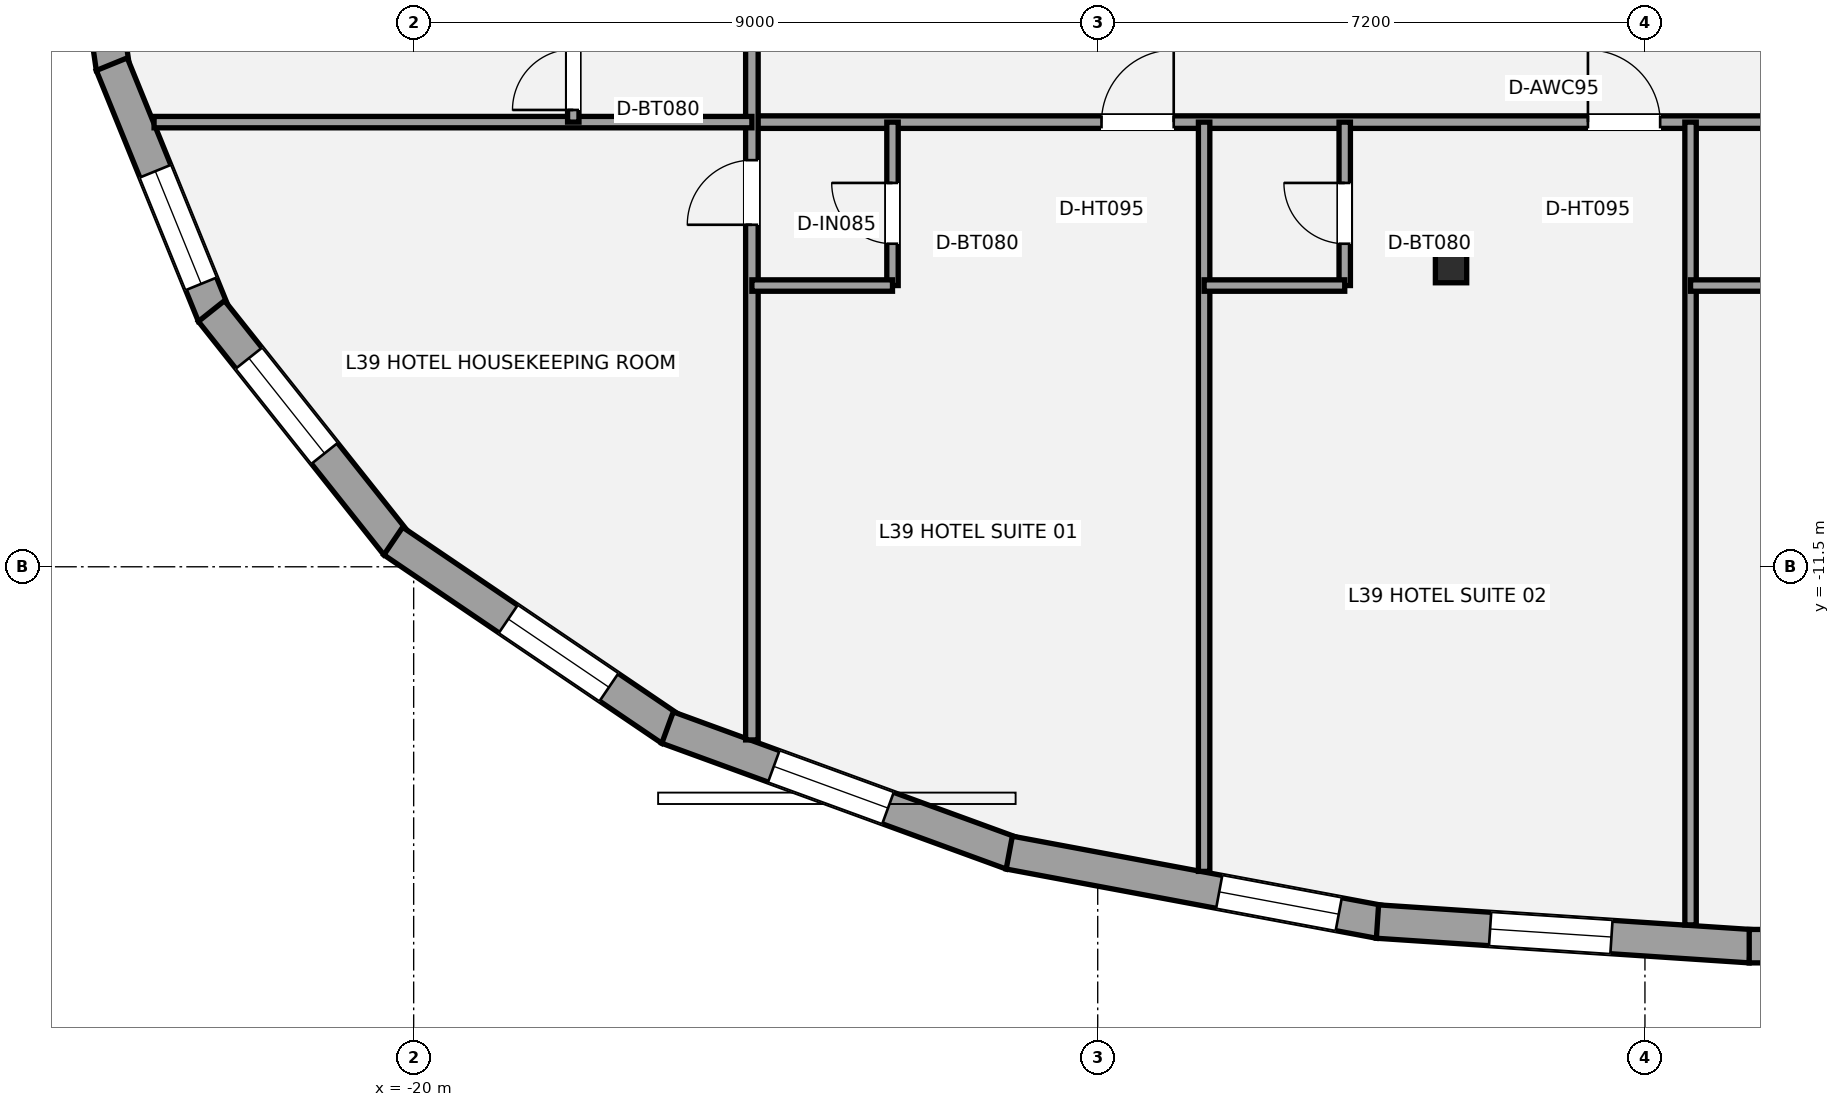
"""IFC4 building model, lengths in metres.
Left out: names, types, materials, properties, quantities, classifications, styles, units other than length and angle.
Written with IfcOpenShell. Run it as: python <this file> out.ifc"""

import sys

from ifc_helpers import new_model, si_unit, direction, frame, frame_2d, origin, origin_2d, place, context, subcontext, project, spatial, rectangle, i_section, extrude, element, fill, save


model = new_model("IFC4")
c1 = context("Model", 3, precision=1e-05, world=origin(), true_north=direction((0.0, 1.0)))
c2 = subcontext(c1, "Body", "Model", "MODEL_VIEW")
j1 = project(units=[si_unit("LENGTHUNIT", "METRE"), si_unit("PLANEANGLEUNIT", "RADIAN")], contexts=[c1])
p1 = place(None, origin())
s1 = spatial("IfcSite", under=j1, at=p1, CompositionType="ELEMENT")
p2 = place(p1, origin())
s2 = spatial("IfcBuilding", under=s1, at=p2, CompositionType="ELEMENT")
p3 = place(p2, frame((0.0, 0.0, 147.0)))
s3 = spatial("IfcBuildingStorey", under=s2, at=p3, CompositionType="ELEMENT", Elevation=147.0)
p4 = place(p3, frame((-6.351, -7.546, 0.0), z_axis=(0.0, 0.0, 1.0), x_axis=(1.0, 0.0, 0.0)))
e1 = element("IfcColumn", 1, at=p4, inside=s3, PredefinedType="COLUMN", context=c2, shape_type="SweptSolid", body=[
    extrude(i_section(OverallWidth=0.412, OverallDepth=0.435, WebThickness=0.036, FlangeThickness=0.057, at=origin_2d()), origin(), (0.0, 0.0, 1.0), 3.2),
])
p5 = place(p3, frame((-23.958, -4.94, 0.0), z_axis=(0.0, 0.0, 1.0), x_axis=(-0.142296299692, 0.989824107149, 0.0)))
e2 = element("IfcWall", 2, at=p5, inside=s3, PredefinedType="STANDARD", context=c2, shape_type="SweptSolid", body=[
    extrude(rectangle(XDim=3.359, YDim=0.44, at=frame_2d((1.68, 0.0))), origin(), (0.0, 0.0, 1.0), 2.315),
])
p6 = place(p5, frame((1.414, 0.0, 0.58)))
e3 = element("IfcOpeningElement", 3, at=p6, cuts=e2, PredefinedType="OPENING", context=c2, shape_type="SweptSolid", body=[
    extrude(rectangle(XDim=1.6, YDim=1.55, at=frame_2d((0.8, 0.775))), frame((0.0, 0.23, 0.0), z_axis=(0.0, -1.0, 0.0), x_axis=(1.0, 0.0, 0.0)), (0.0, 0.0, 1.0), 0.46),
])
p7 = place(p3, frame((-22.629, -8.189, 0.0), z_axis=(0.0, 0.0, 1.0), x_axis=(-0.376863872061, 0.926268655378, 0.0)))
e4 = element("IfcWall", 4, at=p7, inside=s3, PredefinedType="STANDARD", context=c2, shape_type="SweptSolid", body=[
    extrude(rectangle(XDim=3.564, YDim=0.44, at=frame_2d((1.782, 0.0))), origin(), (0.0, 0.0, 1.0), 2.315),
])
p8 = place(p7, frame((0.444, 0.0, 0.58)))
e5 = element("IfcOpeningElement", 5, at=p8, cuts=e4, PredefinedType="OPENING", context=c2, shape_type="SweptSolid", body=[
    extrude(rectangle(XDim=1.6, YDim=1.55, at=frame_2d((0.8, 0.775))), frame((0.0, 0.23, 0.0), z_axis=(0.0, -1.0, 0.0), x_axis=(1.0, 0.0, 0.0)), (0.0, 0.0, 1.0), 0.46),
])
p9 = place(p3, frame((-20.22, -11.207, 0.0), z_axis=(0.0, 0.0, 1.0), x_axis=(-0.622149266174, 0.782898646441, 0.0)))
e6 = element("IfcWall", 6, at=p9, inside=s3, PredefinedType="STANDARD", context=c2, shape_type="SweptSolid", body=[
    extrude(rectangle(XDim=3.923, YDim=0.44, at=frame_2d((1.961, 0.0))), origin(), (0.0, 0.0, 1.0), 2.315),
])
p10 = place(p9, frame((1.531, 0.0, 0.58)))
e7 = element("IfcOpeningElement", 7, at=p10, cuts=e6, PredefinedType="OPENING", context=c2, shape_type="SweptSolid", body=[
    extrude(rectangle(XDim=1.6, YDim=1.55, at=frame_2d((0.8, 0.775))), frame((0.0, 0.23, 0.0), z_axis=(0.0, -1.0, 0.0), x_axis=(1.0, 0.0, 0.0)), (0.0, 0.0, 1.0), 0.46),
])
p11 = place(p3, frame((-16.612, -13.64, 0.0), z_axis=(0.0, 0.0, 1.0), x_axis=(-0.827774624611, 0.561060755044, 0.0)))
e8 = element("IfcWall", 8, at=p11, inside=s3, PredefinedType="STANDARD", context=c2, shape_type="SweptSolid", body=[
    extrude(rectangle(XDim=4.417, YDim=0.44, at=frame_2d((2.209, 0.0))), origin(), (0.0, 0.0, 1.0), 2.315),
])
p12 = place(p11, frame((0.99, 0.0, 0.58)))
e9 = element("IfcOpeningElement", 9, at=p12, cuts=e8, PredefinedType="OPENING", context=c2, shape_type="SweptSolid", body=[
    extrude(rectangle(XDim=1.6, YDim=1.55, at=frame_2d((0.8, 0.775))), frame((0.0, 0.23, 0.0), z_axis=(0.0, -1.0, 0.0), x_axis=(1.0, 0.0, 0.0)), (0.0, 0.0, 1.0), 0.46),
])
p13 = place(p3, frame((-12.129, -15.27, 0.0), z_axis=(0.0, 0.0, 1.0), x_axis=(-0.939349296455, 0.342961950147, 0.0)))
e10 = element("IfcWall", 10, at=p13, inside=s3, PredefinedType="STANDARD", context=c2, shape_type="SweptSolid", body=[
    extrude(rectangle(XDim=4.823, YDim=0.44, at=frame_2d((2.412, 0.0))), origin(), (0.0, 0.0, 1.0), 2.315),
])
p14 = place(p13, frame((1.736, 0.0, 0.58)))
e11 = element("IfcOpeningElement", 11, at=p14, cuts=e10, PredefinedType="OPENING", context=c2, shape_type="SweptSolid", body=[
    extrude(rectangle(XDim=1.6, YDim=1.55, at=frame_2d((0.8, 0.775))), frame((0.0, 0.23, 0.0), z_axis=(0.0, -1.0, 0.0), x_axis=(1.0, 0.0, 0.0)), (0.0, 0.0, 1.0), 0.46),
])
p15 = place(p3, frame((-7.293, -16.171, 0.0), z_axis=(0.0, 0.0, 1.0), x_axis=(-0.98297578121, 0.183735172338, 0.0)))
e12 = element("IfcWall", 12, at=p15, inside=s3, PredefinedType="STANDARD", context=c2, shape_type="SweptSolid", body=[
    extrude(rectangle(XDim=4.955, YDim=0.44, at=frame_2d((2.478, 0.0))), origin(), (0.0, 0.0, 1.0), 2.315),
])
p16 = place(p15, frame((0.545, 0.0, 0.58)))
e13 = element("IfcOpeningElement", 13, at=p16, cuts=e12, PredefinedType="OPENING", context=c2, shape_type="SweptSolid", body=[
    extrude(rectangle(XDim=1.6, YDim=1.55, at=frame_2d((0.8, 0.775))), frame((0.0, 0.23, 0.0), z_axis=(0.0, -1.0, 0.0), x_axis=(1.0, 0.0, 0.0)), (0.0, 0.0, 1.0), 0.46),
])
p17 = place(p3, frame((-2.414, -16.492, 0.0), z_axis=(0.0, 0.0, 1.0), x_axis=(-0.997822793171, 0.065952054018, 0.0)))
e14 = element("IfcWall", 14, at=p17, inside=s3, PredefinedType="STANDARD", context=c2, shape_type="SweptSolid", body=[
    extrude(rectangle(XDim=4.916, YDim=0.44, at=frame_2d((2.458, 0.0))), origin(), (0.0, 0.0, 1.0), 2.315),
])
p18 = place(p17, frame((1.831, 0.0, 0.58)))
e15 = element("IfcOpeningElement", 15, at=p18, cuts=e14, PredefinedType="OPENING", context=c2, shape_type="SweptSolid", body=[
    extrude(rectangle(XDim=1.6, YDim=1.55, at=frame_2d((0.8, 0.775))), frame((0.0, 0.23, 0.0), z_axis=(0.0, -1.0, 0.0), x_axis=(1.0, 0.0, 0.0)), (0.0, 0.0, 1.0), 0.46),
])
p19 = place(p3, frame((2.428, -16.491, 0.0), z_axis=(0.0, 0.0, 1.0), x_axis=(-1.0, 0.0, 0.0)))
e16 = element("IfcWall", 16, at=p19, inside=s3, PredefinedType="STANDARD", context=c2, shape_type="SweptSolid", body=[
    extrude(rectangle(XDim=4.856, YDim=0.44, at=frame_2d((2.428, 0.0))), origin(), (0.0, 0.0, 1.0), 2.315),
])
p20 = place(p19, frame((1.431, 0.0, 0.58)))
e17 = element("IfcOpeningElement", 17, at=p20, cuts=e16, PredefinedType="OPENING", context=c2, shape_type="SweptSolid", body=[
    extrude(rectangle(XDim=1.6, YDim=1.55, at=frame_2d((0.8, 0.775))), frame((0.0, 0.23, 0.0), z_axis=(0.0, -1.0, 0.0), x_axis=(1.0, 0.0, 0.0)), (0.0, 0.0, 1.0), 0.46),
])
p21 = place(p3, frame((-15.55, -5.65, 0.0), z_axis=(0.0, 0.0, 1.0), x_axis=(1.0, 0.0, 0.0)))
e18 = element("IfcWall", 18, at=p21, inside=s3, PredefinedType="PARTITIONING", context=c2, shape_type="SweptSolid", body=[
    extrude(rectangle(XDim=31.1, YDim=0.165, at=frame_2d((15.55, 0.0))), origin(), (0.0, 0.0, 1.0), 2.398),
])
p22 = place(p21, frame((4.6, 0.0, 0.0)))
e19 = element("IfcOpeningElement", 19, at=p22, cuts=e18, PredefinedType="OPENING", context=c2, shape_type="SweptSolid", body=[
    extrude(rectangle(XDim=0.95, YDim=2.15, at=frame_2d((0.475, 1.075))), frame((0.0, 0.093, 0.0), z_axis=(0.0, -1.0, 0.0), x_axis=(1.0, 0.0, 0.0)), (0.0, 0.0, 1.0), 0.185),
])
p23 = place(p21, frame((11.0, 0.0, 0.0)))
e20 = element("IfcOpeningElement", 20, at=p23, cuts=e18, PredefinedType="OPENING", context=c2, shape_type="SweptSolid", body=[
    extrude(rectangle(XDim=0.95, YDim=2.15, at=frame_2d((0.475, 1.075))), frame((0.0, 0.093, 0.0), z_axis=(0.0, -1.0, 0.0), x_axis=(1.0, 0.0, 0.0)), (0.0, 0.0, 1.0), 0.185),
])
p24 = place(p21, frame((17.4, 0.0, 0.0)))
e21 = element("IfcOpeningElement", 21, at=p24, cuts=e18, PredefinedType="OPENING", context=c2, shape_type="SweptSolid", body=[
    extrude(rectangle(XDim=0.95, YDim=2.15, at=frame_2d((0.475, 1.075))), frame((0.0, 0.093, 0.0), z_axis=(0.0, -1.0, 0.0), x_axis=(1.0, 0.0, 0.0)), (0.0, 0.0, 1.0), 0.185),
])
p25 = place(p21, frame((23.8, 0.0, 0.0)))
e22 = element("IfcOpeningElement", 22, at=p25, cuts=e18, PredefinedType="OPENING", context=c2, shape_type="SweptSolid", body=[
    extrude(rectangle(XDim=0.95, YDim=2.15, at=frame_2d((0.475, 1.075))), frame((0.0, 0.093, 0.0), z_axis=(0.0, -1.0, 0.0), x_axis=(1.0, 0.0, 0.0)), (0.0, 0.0, 1.0), 0.185),
])
p26 = place(p21, frame((29.75, 0.0, 0.0)))
e23 = element("IfcOpeningElement", 23, at=p26, cuts=e18, PredefinedType="OPENING", context=c2, shape_type="SweptSolid", body=[
    extrude(rectangle(XDim=0.95, YDim=2.15, at=frame_2d((0.475, 1.075))), frame((0.0, 0.093, 0.0), z_axis=(0.0, -1.0, 0.0), x_axis=(1.0, 0.0, 0.0)), (0.0, 0.0, 1.0), 0.185),
])
p27 = place(p3, frame((-15.55, -13.778, 0.0), z_axis=(0.0, 0.0, 1.0), x_axis=(0.0, 1.0, 0.0)))
e24 = element("IfcWall", 24, at=p27, inside=s3, PredefinedType="PARTITIONING", context=c2, shape_type="SweptSolid", body=[
    extrude(rectangle(XDim=21.328, YDim=0.165, at=frame_2d((10.664, 0.0))), origin(), (0.0, 0.0, 1.0), 2.473),
])
p28 = place(p27, frame((6.777, 0.0, 0.0)))
e25 = element("IfcOpeningElement", 25, at=p28, cuts=e24, PredefinedType="OPENING", context=c2, shape_type="SweptSolid", body=[
    extrude(rectangle(XDim=0.85, YDim=2.1, at=frame_2d((0.425, 1.05))), frame((0.0, 0.093, 0.0), z_axis=(0.0, -1.0, 0.0), x_axis=(1.0, 0.0, 0.0)), (0.0, 0.0, 1.0), 0.185),
])
p29 = place(p27, frame((10.827, 0.0, 0.0)))
e26 = element("IfcOpeningElement", 26, at=p29, cuts=e24, PredefinedType="OPENING", context=c2, shape_type="SweptSolid", body=[
    extrude(rectangle(XDim=0.95, YDim=2.15, at=frame_2d((0.475, 1.075))), frame((0.0, 0.093, 0.0), z_axis=(0.0, -1.0, 0.0), x_axis=(1.0, 0.0, 0.0)), (0.0, 0.0, 1.0), 0.185),
])
p30 = place(p27, frame((15.227, 0.0, 0.0)))
e27 = element("IfcOpeningElement", 27, at=p30, cuts=e24, PredefinedType="OPENING", context=c2, shape_type="SweptSolid", body=[
    extrude(rectangle(XDim=0.95, YDim=2.15, at=frame_2d((0.475, 1.075))), frame((0.0, 0.093, 0.0), z_axis=(0.0, -1.0, 0.0), x_axis=(1.0, 0.0, 0.0)), (0.0, 0.0, 1.0), 0.185),
])
p31 = place(p27, frame((19.977, 0.0, 0.0)))
e28 = element("IfcOpeningElement", 28, at=p31, cuts=e24, PredefinedType="OPENING", context=c2, shape_type="SweptSolid", body=[
    extrude(rectangle(XDim=0.95, YDim=2.15, at=frame_2d((0.475, 1.075))), frame((0.0, 0.093, 0.0), z_axis=(0.0, -1.0, 0.0), x_axis=(1.0, 0.0, 0.0)), (0.0, 0.0, 1.0), 0.185),
])
p32 = place(p3, frame((-23.416, -5.65, 0.0), z_axis=(0.0, 0.0, 1.0), x_axis=(1.0, 0.0, 0.0)))
e29 = element("IfcWall", 29, at=p32, inside=s3, PredefinedType="PLUMBINGWALL", context=c2, shape_type="SweptSolid", body=[
    extrude(rectangle(XDim=7.866, YDim=0.15, at=frame_2d((3.933, 0.0))), origin(), (0.0, 0.0, 1.0), 2.473),
])
p33 = place(p3, frame((-9.6, -15.508, 0.0), z_axis=(0.0, 0.0, 1.0), x_axis=(0.0, 1.0, 0.0)))
e30 = element("IfcWall", 30, at=p33, inside=s3, PredefinedType="PLUMBINGWALL", context=c2, shape_type="SweptSolid", body=[
    extrude(rectangle(XDim=9.858, YDim=0.15, at=frame_2d((4.929, 0.0))), origin(), (0.0, 0.0, 1.0), 3.02),
])
p34 = place(p3, frame((-3.2, -16.211, 0.0), z_axis=(0.0, 0.0, 1.0), x_axis=(0.0, 1.0, 0.0)))
e31 = element("IfcWall", 31, at=p34, inside=s3, PredefinedType="PLUMBINGWALL", context=c2, shape_type="SweptSolid", body=[
    extrude(rectangle(XDim=10.561, YDim=0.15, at=frame_2d((5.281, 0.0))), origin(), (0.0, 0.0, 1.0), 2.473),
])
p35 = place(p3, frame((-13.7, -7.8, 0.0), z_axis=(0.0, 0.0, 1.0), x_axis=(0.0, 1.0, 0.0)))
e32 = element("IfcWall", 32, at=p35, inside=s3, PredefinedType="PLUMBINGWALL", context=c2, shape_type="SweptSolid", body=[
    extrude(rectangle(XDim=2.15, YDim=0.15, at=frame_2d((1.075, 0.0))), origin(), (0.0, 0.0, 1.0), 3.02),
])
p36 = place(p35, frame((0.55, 0.0, 0.0)))
e33 = element("IfcOpeningElement", 33, at=p36, cuts=e32, PredefinedType="OPENING", context=c2, shape_type="SweptSolid", body=[
    extrude(rectangle(XDim=0.8, YDim=2.1, at=frame_2d((0.4, 1.05))), frame((0.0, 0.085, 0.0), z_axis=(0.0, -1.0, 0.0), x_axis=(1.0, 0.0, 0.0)), (0.0, 0.0, 1.0), 0.17),
])
p37 = place(p3, frame((-15.55, -7.8, 0.0), z_axis=(0.0, 0.0, 1.0), x_axis=(1.0, 0.0, 0.0)))
e34 = element("IfcWall", 34, at=p37, inside=s3, PredefinedType="PLUMBINGWALL", context=c2, shape_type="SweptSolid", body=[
    extrude(rectangle(XDim=1.85, YDim=0.15, at=frame_2d((0.925, 0.0))), origin(), (0.0, 0.0, 1.0), 3.02),
])
p38 = place(p3, frame((-7.75, -7.8, 0.0), z_axis=(0.0, 0.0, 1.0), x_axis=(0.0, 1.0, 0.0)))
e35 = element("IfcWall", 35, at=p38, inside=s3, PredefinedType="PLUMBINGWALL", context=c2, shape_type="SweptSolid", body=[
    extrude(rectangle(XDim=2.15, YDim=0.15, at=frame_2d((1.075, 0.0))), origin(), (0.0, 0.0, 1.0), 3.02),
])
p39 = place(p38, frame((0.55, 0.0, 0.0)))
e36 = element("IfcOpeningElement", 36, at=p39, cuts=e35, PredefinedType="OPENING", context=c2, shape_type="SweptSolid", body=[
    extrude(rectangle(XDim=0.8, YDim=2.1, at=frame_2d((0.4, 1.05))), frame((0.0, 0.085, 0.0), z_axis=(0.0, -1.0, 0.0), x_axis=(1.0, 0.0, 0.0)), (0.0, 0.0, 1.0), 0.17),
])
p40 = place(p3, frame((-9.6, -7.8, 0.0), z_axis=(0.0, 0.0, 1.0), x_axis=(1.0, 0.0, 0.0)))
e37 = element("IfcWall", 37, at=p40, inside=s3, PredefinedType="PLUMBINGWALL", context=c2, shape_type="SweptSolid", body=[
    extrude(rectangle(XDim=1.85, YDim=0.15, at=frame_2d((0.925, 0.0))), origin(), (0.0, 0.0, 1.0), 3.02),
])
p41 = place(p3, frame((-3.2, -7.8, 0.0), z_axis=(0.0, 0.0, 1.0), x_axis=(1.0, 0.0, 0.0)))
e38 = element("IfcWall", 38, at=p41, inside=s3, PredefinedType="PLUMBINGWALL", context=c2, shape_type="SweptSolid", body=[
    extrude(rectangle(XDim=1.85, YDim=0.15, at=frame_2d((0.925, 0.0))), origin(), (0.0, 0.0, 1.0), 3.02),
])
p42 = place(p3, frame((-17.9, -5.65, 0.0), z_axis=(0.0, 0.0, 1.0), x_axis=(0.0, 1.0, 0.0)))
e39 = element("IfcWall", 39, at=p42, inside=s3, PredefinedType="PLUMBINGWALL", context=c2, shape_type="SweptSolid", body=[
    extrude(rectangle(XDim=2.15, YDim=0.15, at=frame_2d((1.075, 0.0))), origin(), (0.0, 0.0, 1.0), 3.02),
])
p43 = place(p42, frame((0.16, 0.0, 0.0)))
e40 = element("IfcOpeningElement", 40, at=p43, cuts=e39, PredefinedType="OPENING", context=c2, shape_type="SweptSolid", body=[
    extrude(rectangle(XDim=0.8, YDim=2.1, at=frame_2d((0.4, 1.05))), frame((0.0, 0.085, 0.0), z_axis=(0.0, -1.0, 0.0), x_axis=(1.0, 0.0, 0.0)), (0.0, 0.0, 1.0), 0.17),
])
p44 = place(p8, origin())
e41 = element("IfcWindow", 41, at=p44, inside=s3, PartitioningType="SINGLE_PANEL", PredefinedType="WINDOW", context=c2, shape_type="SweptSolid", body=[
    extrude(rectangle(XDim=1.6, YDim=1.55, at=frame_2d((0.8, 0.775))), frame((0.0, -0.01, 0.0), z_axis=(0.0, -1.0, 0.0), x_axis=(1.0, 0.0, 0.0)), (0.0, 0.0, 1.0), 0.06),
])
fill(e5, e41)
p45 = place(p10, origin())
e42 = element("IfcWindow", 42, at=p45, inside=s3, PartitioningType="SINGLE_PANEL", PredefinedType="WINDOW", context=c2, shape_type="SweptSolid", body=[
    extrude(rectangle(XDim=1.6, YDim=1.55, at=frame_2d((0.8, 0.775))), frame((0.0, -0.01, 0.0), z_axis=(0.0, -1.0, 0.0), x_axis=(1.0, 0.0, 0.0)), (0.0, 0.0, 1.0), 0.06),
])
fill(e7, e42)
p46 = place(p12, origin())
e43 = element("IfcWindow", 43, at=p46, inside=s3, PartitioningType="SINGLE_PANEL", PredefinedType="WINDOW", context=c2, shape_type="SweptSolid", body=[
    extrude(rectangle(XDim=1.6, YDim=1.55, at=frame_2d((0.8, 0.775))), frame((0.0, -0.01, 0.0), z_axis=(0.0, -1.0, 0.0), x_axis=(1.0, 0.0, 0.0)), (0.0, 0.0, 1.0), 0.06),
])
fill(e9, e43)
p47 = place(p14, origin())
e44 = element("IfcWindow", 44, at=p47, inside=s3, PartitioningType="SINGLE_PANEL", PredefinedType="WINDOW", context=c2, shape_type="SweptSolid", body=[
    extrude(rectangle(XDim=1.6, YDim=1.55, at=frame_2d((0.8, 0.775))), frame((0.0, -0.01, 0.0), z_axis=(0.0, -1.0, 0.0), x_axis=(1.0, 0.0, 0.0)), (0.0, 0.0, 1.0), 0.06),
])
fill(e11, e44)
p48 = place(p16, origin())
e45 = element("IfcWindow", 45, at=p48, inside=s3, PartitioningType="SINGLE_PANEL", PredefinedType="WINDOW", context=c2, shape_type="SweptSolid", body=[
    extrude(rectangle(XDim=1.6, YDim=1.55, at=frame_2d((0.8, 0.775))), frame((0.0, -0.01, 0.0), z_axis=(0.0, -1.0, 0.0), x_axis=(1.0, 0.0, 0.0)), (0.0, 0.0, 1.0), 0.06),
])
fill(e13, e45)
p49 = place(p18, origin())
e46 = element("IfcWindow", 46, at=p49, inside=s3, PartitioningType="SINGLE_PANEL", PredefinedType="WINDOW", context=c2, shape_type="SweptSolid", body=[
    extrude(rectangle(XDim=1.6, YDim=1.55, at=frame_2d((0.8, 0.775))), frame((0.0, -0.01, 0.0), z_axis=(0.0, -1.0, 0.0), x_axis=(1.0, 0.0, 0.0)), (0.0, 0.0, 1.0), 0.06),
])
fill(e15, e46)
p50 = place(p28, origin())
e47 = element("IfcDoor", 47, at=p50, inside=s3, OperationType="SINGLE_SWING_LEFT", PredefinedType="DOOR", context=c2, shape_type="SweptSolid", body=[
    extrude(rectangle(XDim=0.85, YDim=2.1, at=frame_2d((0.425, 1.05))), frame((0.0, 0.025, 0.0), z_axis=(0.0, -1.0, 0.0), x_axis=(1.0, 0.0, 0.0)), (0.0, 0.0, 1.0), 0.05),
])
fill(e25, e47)
p51 = place(p22, origin())
e48 = element("IfcDoor", 48, at=p51, inside=s3, OperationType="SINGLE_SWING_RIGHT", PredefinedType="DOOR", context=c2, shape_type="SweptSolid", body=[
    extrude(rectangle(XDim=0.95, YDim=2.15, at=frame_2d((0.475, 1.075))), frame((0.0, 0.025, 0.0), z_axis=(0.0, -1.0, 0.0), x_axis=(1.0, 0.0, 0.0)), (0.0, 0.0, 1.0), 0.05),
])
fill(e19, e48)
p52 = place(p36, origin())
e49 = element("IfcDoor", 49, at=p52, inside=s3, OperationType="SINGLE_SWING_RIGHT", PredefinedType="DOOR", context=c2, shape_type="SweptSolid", body=[
    extrude(rectangle(XDim=0.8, YDim=2.1, at=frame_2d((0.4, 1.05))), frame((0.0, 0.025, 0.0), z_axis=(0.0, -1.0, 0.0), x_axis=(1.0, 0.0, 0.0)), (0.0, 0.0, 1.0), 0.05),
])
fill(e33, e49)
p53 = place(p23, origin())
e50 = element("IfcDoor", 50, at=p53, inside=s3, OperationType="SINGLE_SWING_LEFT", PredefinedType="DOOR", context=c2, shape_type="SweptSolid", body=[
    extrude(rectangle(XDim=0.95, YDim=2.15, at=frame_2d((0.475, 1.075))), frame((0.0, 0.025, 0.0), z_axis=(0.0, -1.0, 0.0), x_axis=(1.0, 0.0, 0.0)), (0.0, 0.0, 1.0), 0.05),
])
fill(e20, e50)
p54 = place(p39, origin())
e51 = element("IfcDoor", 51, at=p54, inside=s3, OperationType="SINGLE_SWING_RIGHT", PredefinedType="DOOR", context=c2, shape_type="SweptSolid", body=[
    extrude(rectangle(XDim=0.8, YDim=2.1, at=frame_2d((0.4, 1.05))), frame((0.0, 0.025, 0.0), z_axis=(0.0, -1.0, 0.0), x_axis=(1.0, 0.0, 0.0)), (0.0, 0.0, 1.0), 0.05),
])
fill(e36, e51)
p55 = place(p43, origin())
e52 = element("IfcDoor", 52, at=p55, inside=s3, OperationType="SINGLE_SWING_LEFT", PredefinedType="DOOR", context=c2, shape_type="SweptSolid", body=[
    extrude(rectangle(XDim=0.8, YDim=2.1, at=frame_2d((0.4, 1.05))), frame((0.0, 0.025, 0.0), z_axis=(0.0, -1.0, 0.0), x_axis=(1.0, 0.0, 0.0)), (0.0, 0.0, 1.0), 0.05),
])
fill(e40, e52)
save(model, sys.argv[1])
